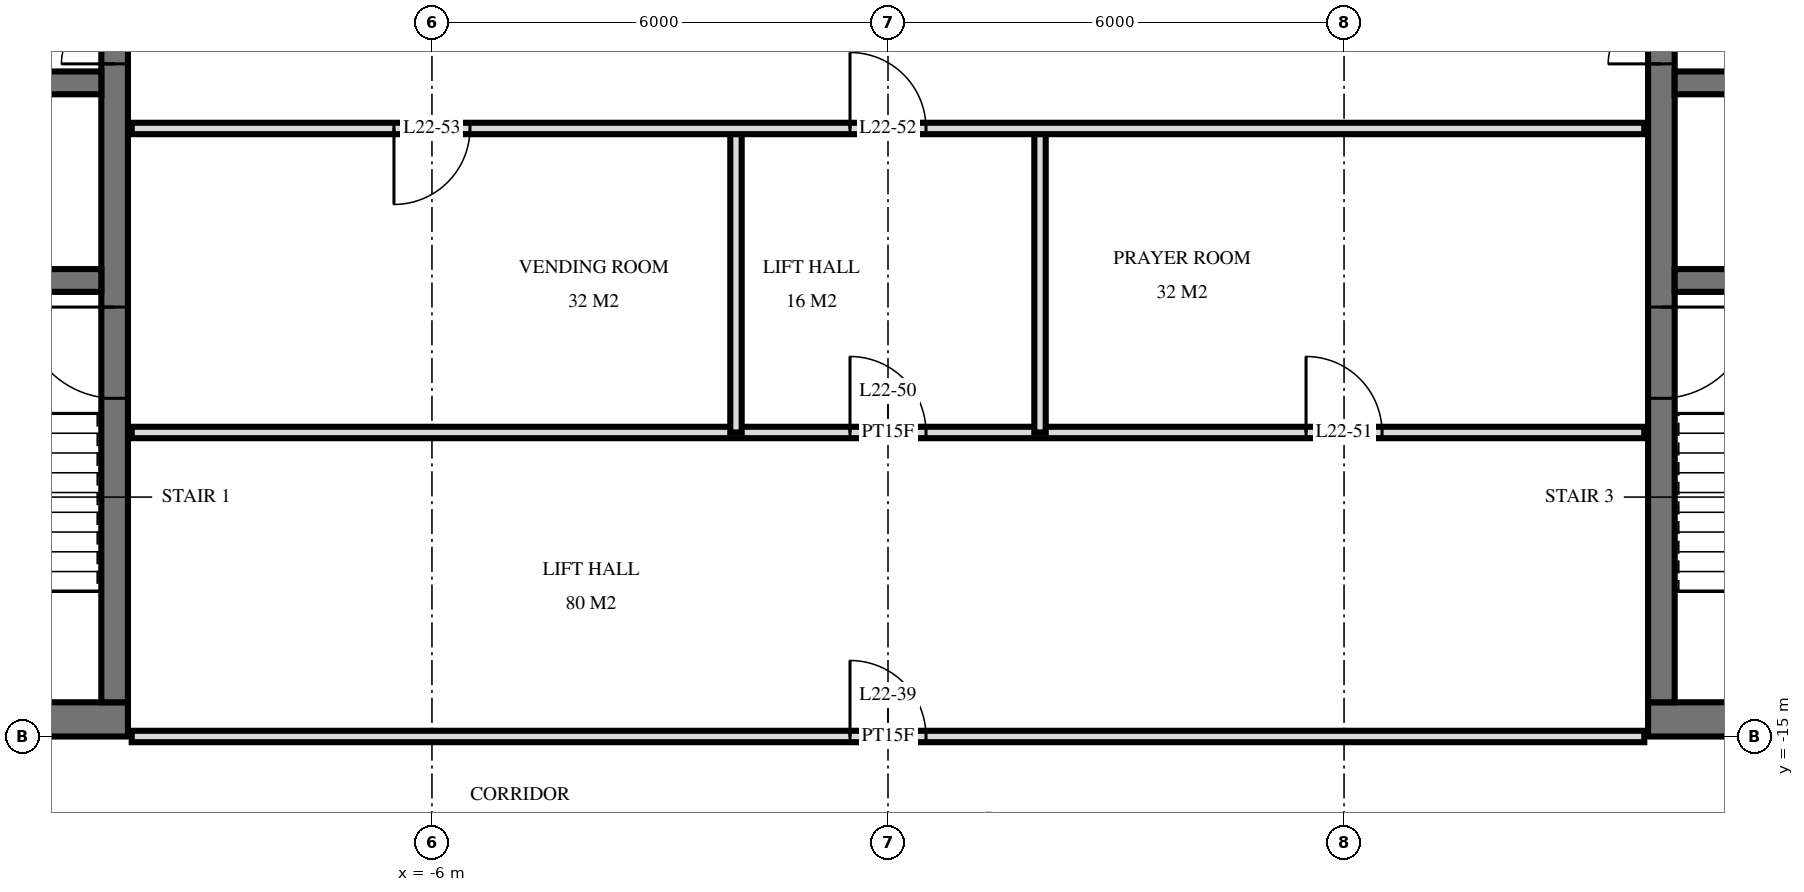
"""IFC4 building model, lengths in metres.
Left out: names, types, materials, properties, quantities, classifications, styles, units other than length and angle.
Written with IfcOpenShell. Run it as: python <this file> out.ifc"""

import sys

from ifc_helpers import new_model, si_unit, direction, frame, frame_2d, origin, place, context, subcontext, project, spatial, rectangle, extrude, element, fill, save


model = new_model("IFC4")
c1 = context("Model", 3, precision=1e-05, world=origin(), true_north=direction((0.0, 1.0)))
c2 = subcontext(c1, "Body", "Model", "MODEL_VIEW")
j1 = project(units=[si_unit("LENGTHUNIT", "METRE"), si_unit("PLANEANGLEUNIT", "RADIAN")], contexts=[c1])
p1 = place(None, origin())
s1 = spatial("IfcSite", under=j1, at=p1, CompositionType="ELEMENT")
p2 = place(p1, origin())
s2 = spatial("IfcBuilding", under=s1, at=p2, CompositionType="ELEMENT")
p3 = place(p2, frame((0.0, 0.0, 88.8)))
s3 = spatial("IfcBuildingStorey", under=s2, at=p3, CompositionType="ELEMENT", Elevation=88.8)
p4 = place(p3, frame((-29.5, -14.775, 0.0), z_axis=(0.0, 0.0, 1.0), x_axis=(1.0, 0.0, 0.0)))
e1 = element("IfcWall", 1, at=p4, inside=s3, PredefinedType="SHEAR", context=c2, shape_type="SweptSolid", body=[
    extrude(rectangle(XDim=19.5, YDim=0.45, at=frame_2d((9.75, 0.0))), origin(), (0.0, 0.0, 1.0), 3.6),
])
p5 = place(p4, frame((11.2, 0.0, 0.0)))
e2 = element("IfcOpeningElement", 2, at=p5, cuts=e1, PredefinedType="OPENING", context=c2, shape_type="SweptSolid", body=[
    extrude(rectangle(XDim=1.2, YDim=2.1, at=frame_2d((0.6, 1.05))), frame((0.0, 0.235, 0.0), z_axis=(0.0, -1.0, 0.0), x_axis=(1.0, 0.0, 0.0)), (0.0, 0.0, 1.0), 0.47),
])
p6 = place(p4, frame((14.25, 0.0, 0.0)))
e3 = element("IfcOpeningElement", 3, at=p6, cuts=e1, PredefinedType="OPENING", context=c2, shape_type="SweptSolid", body=[
    extrude(rectangle(XDim=1.1, YDim=2.1, at=frame_2d((0.55, 1.05))), frame((0.0, 0.235, 0.0), z_axis=(0.0, -1.0, 0.0), x_axis=(1.0, 0.0, 0.0)), (0.0, 0.0, 1.0), 0.47),
])
p7 = place(p4, frame((8.5, 0.0, 0.0)))
e4 = element("IfcOpeningElement", 4, at=p7, cuts=e1, PredefinedType="OPENING", context=c2, shape_type="SweptSolid", body=[
    extrude(rectangle(XDim=0.9, YDim=2.1, at=frame_2d((0.45, 1.05))), frame((0.0, 0.235, 0.0), z_axis=(0.0, -1.0, 0.0), x_axis=(1.0, 0.0, 0.0)), (0.0, 0.0, 1.0), 0.47),
])
p8 = place(p4, frame((6.05, 0.0, 0.0)))
e5 = element("IfcOpeningElement", 5, at=p8, cuts=e1, PredefinedType="OPENING", context=c2, shape_type="SweptSolid", body=[
    extrude(rectangle(XDim=1.0, YDim=2.1, at=frame_2d((0.5, 1.05))), frame((0.0, 0.235, 0.0), z_axis=(0.0, -1.0, 0.0), x_axis=(1.0, 0.0, 0.0)), (0.0, 0.0, 1.0), 0.47),
])
p9 = place(p4, frame((3.587, 0.0, 0.0)))
e6 = element("IfcOpeningElement", 6, at=p9, cuts=e1, PredefinedType="OPENING", context=c2, shape_type="SweptSolid", body=[
    extrude(rectangle(XDim=1.0, YDim=2.1, at=frame_2d((0.5, 1.05))), frame((0.0, 0.235, 0.0), z_axis=(0.0, -1.0, 0.0), x_axis=(1.0, 0.0, 0.0)), (0.0, 0.0, 1.0), 0.47),
])
p10 = place(p4, frame((1.85, 0.0, 0.0)))
e7 = element("IfcOpeningElement", 7, at=p10, cuts=e1, PredefinedType="OPENING", context=c2, shape_type="SweptSolid", body=[
    extrude(rectangle(XDim=1.0, YDim=2.1, at=frame_2d((0.5, 1.05))), frame((0.0, 0.235, 0.0), z_axis=(0.0, -1.0, 0.0), x_axis=(1.0, 0.0, 0.0)), (0.0, 0.0, 1.0), 0.47),
])
p11 = place(p4, frame((0.55, 0.0, 0.0)))
e8 = element("IfcOpeningElement", 8, at=p11, cuts=e1, PredefinedType="OPENING", context=c2, shape_type="SweptSolid", body=[
    extrude(rectangle(XDim=1.0, YDim=2.1, at=frame_2d((0.5, 1.05))), frame((0.0, 0.235, 0.0), z_axis=(0.0, -1.0, 0.0), x_axis=(1.0, 0.0, 0.0)), (0.0, 0.0, 1.0), 0.47),
])
p12 = place(p3, frame((-10.175, -14.55, 0.0), z_axis=(0.0, 0.0, 1.0), x_axis=(0.0, 1.0, 0.0)))
e9 = element("IfcWall", 9, at=p12, inside=s3, PredefinedType="SHEAR", context=c2, shape_type="SweptSolid", body=[
    extrude(rectangle(XDim=14.1, YDim=0.35, at=frame_2d((7.05, 0.0))), origin(), (0.0, 0.0, 1.0), 3.6),
])
p13 = place(p12, frame((8.4, 0.0, 0.0)))
e10 = element("IfcOpeningElement", 10, at=p13, cuts=e9, PredefinedType="OPENING", context=c2, shape_type="SweptSolid", body=[
    extrude(rectangle(XDim=1.4, YDim=2.4, at=frame_2d((0.7, 1.2))), frame((0.0, 0.185, 0.0), z_axis=(0.0, -1.0, 0.0), x_axis=(1.0, 0.0, 0.0)), (0.0, 0.0, 1.0), 0.37),
])
p14 = place(p12, frame((10.0, 0.0, 0.0)))
e11 = element("IfcOpeningElement", 11, at=p14, cuts=e9, PredefinedType="OPENING", context=c2, shape_type="SweptSolid", body=[
    extrude(rectangle(XDim=1.4, YDim=2.4, at=frame_2d((0.7, 1.2))), frame((0.0, 0.185, 0.0), z_axis=(0.0, -1.0, 0.0), x_axis=(1.0, 0.0, 0.0)), (0.0, 0.0, 1.0), 0.37),
])
p15 = place(p12, frame((4.0, 0.0, 0.0)))
e12 = element("IfcOpeningElement", 12, at=p15, cuts=e9, PredefinedType="OPENING", context=c2, shape_type="SweptSolid", body=[
    extrude(rectangle(XDim=1.2, YDim=2.1, at=frame_2d((0.6, 1.05))), frame((0.0, 0.185, 0.0), z_axis=(0.0, -1.0, 0.0), x_axis=(1.0, 0.0, 0.0)), (0.0, 0.0, 1.0), 0.37),
])
p16 = place(p3, frame((-29.05, -6.4, 0.0), z_axis=(0.0, 0.0, 1.0), x_axis=(1.0, 0.0, 0.0)))
e13 = element("IfcWall", 13, at=p16, inside=s3, PredefinedType="SHEAR", context=c2, shape_type="SweptSolid", body=[
    extrude(rectangle(XDim=18.7, YDim=0.3, at=frame_2d((9.35, 0.0))), origin(), (0.0, 0.0, 1.0), 3.6),
])
p17 = place(p16, frame((2.95, 0.0, 0.0)))
e14 = element("IfcOpeningElement", 14, at=p17, cuts=e13, PredefinedType="OPENING", context=c2, shape_type="SweptSolid", body=[
    extrude(rectangle(XDim=1.1, YDim=2.1, at=frame_2d((0.55, 1.05))), frame((0.0, 0.16, 0.0), z_axis=(0.0, -1.0, 0.0), x_axis=(1.0, 0.0, 0.0)), (0.0, 0.0, 1.0), 0.32),
])
p18 = place(p16, frame((0.55, 0.0, 0.0)))
e15 = element("IfcOpeningElement", 15, at=p18, cuts=e13, PredefinedType="OPENING", context=c2, shape_type="SweptSolid", body=[
    extrude(rectangle(XDim=1.1, YDim=2.1, at=frame_2d((0.55, 1.05))), frame((0.0, 0.16, 0.0), z_axis=(0.0, -1.0, 0.0), x_axis=(1.0, 0.0, 0.0)), (0.0, 0.0, 1.0), 0.32),
])
p19 = place(p16, frame((10.8, 0.0, 0.0)))
e16 = element("IfcOpeningElement", 16, at=p19, cuts=e13, PredefinedType="OPENING", context=c2, shape_type="SweptSolid", body=[
    extrude(rectangle(XDim=1.1, YDim=2.1, at=frame_2d((0.55, 1.05))), frame((0.0, 0.16, 0.0), z_axis=(0.0, -1.0, 0.0), x_axis=(1.0, 0.0, 0.0)), (0.0, 0.0, 1.0), 0.32),
])
p20 = place(p16, frame((5.6, 0.0, 0.0)))
e17 = element("IfcOpeningElement", 17, at=p20, cuts=e13, PredefinedType="OPENING", context=c2, shape_type="SweptSolid", body=[
    extrude(rectangle(XDim=1.0, YDim=2.1, at=frame_2d((0.5, 1.05))), frame((0.0, 0.16, 0.0), z_axis=(0.0, -1.0, 0.0), x_axis=(1.0, 0.0, 0.0)), (0.0, 0.0, 1.0), 0.32),
])
p21 = place(p3, frame((-29.05, -9.0, 0.0), z_axis=(0.0, 0.0, 1.0), x_axis=(1.0, 0.0, 0.0)))
e18 = element("IfcWall", 18, at=p21, inside=s3, PredefinedType="SHEAR", context=c2, shape_type="SweptSolid", body=[
    extrude(rectangle(XDim=18.7, YDim=0.3, at=frame_2d((9.35, 0.0))), origin(), (0.0, 0.0, 1.0), 3.6),
])
p22 = place(p21, frame((13.8, 0.0, 0.0)))
e19 = element("IfcOpeningElement", 19, at=p22, cuts=e18, PredefinedType="OPENING", context=c2, shape_type="SweptSolid", body=[
    extrude(rectangle(XDim=1.1, YDim=2.1, at=frame_2d((0.55, 1.05))), frame((0.0, 0.16, 0.0), z_axis=(0.0, -1.0, 0.0), x_axis=(1.0, 0.0, 0.0)), (0.0, 0.0, 1.0), 0.32),
])
p23 = place(p3, frame((10.0, -14.775, 0.0), z_axis=(0.0, 0.0, 1.0), x_axis=(1.0, 0.0, 0.0)))
e20 = element("IfcWall", 20, at=p23, inside=s3, PredefinedType="SHEAR", context=c2, shape_type="SweptSolid", body=[
    extrude(rectangle(XDim=19.5, YDim=0.45, at=frame_2d((9.75, 0.0))), origin(), (0.0, 0.0, 1.0), 3.6),
])
p24 = place(p23, frame((7.1, 0.0, 0.0)))
e21 = element("IfcOpeningElement", 21, at=p24, cuts=e20, PredefinedType="OPENING", context=c2, shape_type="SweptSolid", body=[
    extrude(rectangle(XDim=1.2, YDim=2.1, at=frame_2d((0.6, 1.05))), frame((0.0, 0.235, 0.0), z_axis=(0.0, -1.0, 0.0), x_axis=(1.0, 0.0, 0.0)), (0.0, 0.0, 1.0), 0.47),
])
p25 = place(p23, frame((4.15, 0.0, 0.0)))
e22 = element("IfcOpeningElement", 22, at=p25, cuts=e20, PredefinedType="OPENING", context=c2, shape_type="SweptSolid", body=[
    extrude(rectangle(XDim=1.1, YDim=2.1, at=frame_2d((0.55, 1.05))), frame((0.0, 0.235, 0.0), z_axis=(0.0, -1.0, 0.0), x_axis=(1.0, 0.0, 0.0)), (0.0, 0.0, 1.0), 0.47),
])
p26 = place(p23, frame((10.1, 0.0, 0.0)))
e23 = element("IfcOpeningElement", 23, at=p26, cuts=e20, PredefinedType="OPENING", context=c2, shape_type="SweptSolid", body=[
    extrude(rectangle(XDim=0.9, YDim=2.1, at=frame_2d((0.45, 1.05))), frame((0.0, 0.235, 0.0), z_axis=(0.0, -1.0, 0.0), x_axis=(1.0, 0.0, 0.0)), (0.0, 0.0, 1.0), 0.47),
])
p27 = place(p23, frame((12.45, 0.0, 0.0)))
e24 = element("IfcOpeningElement", 24, at=p27, cuts=e20, PredefinedType="OPENING", context=c2, shape_type="SweptSolid", body=[
    extrude(rectangle(XDim=1.0, YDim=2.1, at=frame_2d((0.5, 1.05))), frame((0.0, 0.235, 0.0), z_axis=(0.0, -1.0, 0.0), x_axis=(1.0, 0.0, 0.0)), (0.0, 0.0, 1.0), 0.47),
])
p28 = place(p23, frame((14.913, 0.0, 0.0)))
e25 = element("IfcOpeningElement", 25, at=p28, cuts=e20, PredefinedType="OPENING", context=c2, shape_type="SweptSolid", body=[
    extrude(rectangle(XDim=1.0, YDim=2.1, at=frame_2d((0.5, 1.05))), frame((0.0, 0.235, 0.0), z_axis=(0.0, -1.0, 0.0), x_axis=(1.0, 0.0, 0.0)), (0.0, 0.0, 1.0), 0.47),
])
p29 = place(p23, frame((16.65, 0.0, 0.0)))
e26 = element("IfcOpeningElement", 26, at=p29, cuts=e20, PredefinedType="OPENING", context=c2, shape_type="SweptSolid", body=[
    extrude(rectangle(XDim=1.0, YDim=2.1, at=frame_2d((0.5, 1.05))), frame((0.0, 0.235, 0.0), z_axis=(0.0, -1.0, 0.0), x_axis=(1.0, 0.0, 0.0)), (0.0, 0.0, 1.0), 0.47),
])
p30 = place(p23, frame((18.025, 0.0, 0.0)))
e27 = element("IfcOpeningElement", 27, at=p30, cuts=e20, PredefinedType="OPENING", context=c2, shape_type="SweptSolid", body=[
    extrude(rectangle(XDim=1.0, YDim=2.1, at=frame_2d((0.5, 1.05))), frame((0.0, 0.235, 0.0), z_axis=(0.0, -1.0, 0.0), x_axis=(1.0, 0.0, 0.0)), (0.0, 0.0, 1.0), 0.47),
])
p31 = place(p3, frame((10.175, -14.55, 0.0), z_axis=(0.0, 0.0, 1.0), x_axis=(0.0, 1.0, 0.0)))
e28 = element("IfcWall", 28, at=p31, inside=s3, PredefinedType="SHEAR", context=c2, shape_type="SweptSolid", body=[
    extrude(rectangle(XDim=14.1, YDim=0.35, at=frame_2d((7.05, 0.0))), origin(), (0.0, 0.0, 1.0), 3.6),
])
p32 = place(p31, frame((8.4, 0.0, 0.0)))
e29 = element("IfcOpeningElement", 29, at=p32, cuts=e28, PredefinedType="OPENING", context=c2, shape_type="SweptSolid", body=[
    extrude(rectangle(XDim=1.4, YDim=2.4, at=frame_2d((0.7, 1.2))), frame((0.0, 0.185, 0.0), z_axis=(0.0, -1.0, 0.0), x_axis=(1.0, 0.0, 0.0)), (0.0, 0.0, 1.0), 0.37),
])
p33 = place(p31, frame((10.0, 0.0, 0.0)))
e30 = element("IfcOpeningElement", 30, at=p33, cuts=e28, PredefinedType="OPENING", context=c2, shape_type="SweptSolid", body=[
    extrude(rectangle(XDim=1.4, YDim=2.4, at=frame_2d((0.7, 1.2))), frame((0.0, 0.185, 0.0), z_axis=(0.0, -1.0, 0.0), x_axis=(1.0, 0.0, 0.0)), (0.0, 0.0, 1.0), 0.37),
])
p34 = place(p31, frame((4.0, 0.0, 0.0)))
e31 = element("IfcOpeningElement", 31, at=p34, cuts=e28, PredefinedType="OPENING", context=c2, shape_type="SweptSolid", body=[
    extrude(rectangle(XDim=1.2, YDim=2.1, at=frame_2d((0.6, 1.05))), frame((0.0, 0.185, 0.0), z_axis=(0.0, -1.0, 0.0), x_axis=(1.0, 0.0, 0.0)), (0.0, 0.0, 1.0), 0.37),
])
p35 = place(p3, frame((10.35, -6.4, 0.0), z_axis=(0.0, 0.0, 1.0), x_axis=(1.0, 0.0, 0.0)))
e32 = element("IfcWall", 32, at=p35, inside=s3, PredefinedType="SHEAR", context=c2, shape_type="SweptSolid", body=[
    extrude(rectangle(XDim=18.7, YDim=0.3, at=frame_2d((9.35, 0.0))), origin(), (0.0, 0.0, 1.0), 3.6),
])
p36 = place(p35, frame((14.65, 0.0, 0.0)))
e33 = element("IfcOpeningElement", 33, at=p36, cuts=e32, PredefinedType="OPENING", context=c2, shape_type="SweptSolid", body=[
    extrude(rectangle(XDim=1.1, YDim=2.1, at=frame_2d((0.55, 1.05))), frame((0.0, 0.16, 0.0), z_axis=(0.0, -1.0, 0.0), x_axis=(1.0, 0.0, 0.0)), (0.0, 0.0, 1.0), 0.32),
])
p37 = place(p35, frame((17.05, 0.0, 0.0)))
e34 = element("IfcOpeningElement", 34, at=p37, cuts=e32, PredefinedType="OPENING", context=c2, shape_type="SweptSolid", body=[
    extrude(rectangle(XDim=1.1, YDim=2.1, at=frame_2d((0.55, 1.05))), frame((0.0, 0.16, 0.0), z_axis=(0.0, -1.0, 0.0), x_axis=(1.0, 0.0, 0.0)), (0.0, 0.0, 1.0), 0.32),
])
p38 = place(p35, frame((6.8, 0.0, 0.0)))
e35 = element("IfcOpeningElement", 35, at=p38, cuts=e32, PredefinedType="OPENING", context=c2, shape_type="SweptSolid", body=[
    extrude(rectangle(XDim=1.1, YDim=2.1, at=frame_2d((0.55, 1.05))), frame((0.0, 0.16, 0.0), z_axis=(0.0, -1.0, 0.0), x_axis=(1.0, 0.0, 0.0)), (0.0, 0.0, 1.0), 0.32),
])
p39 = place(p35, frame((12.1, 0.0, 0.0)))
e36 = element("IfcOpeningElement", 36, at=p39, cuts=e32, PredefinedType="OPENING", context=c2, shape_type="SweptSolid", body=[
    extrude(rectangle(XDim=1.0, YDim=2.1, at=frame_2d((0.5, 1.05))), frame((0.0, 0.16, 0.0), z_axis=(0.0, -1.0, 0.0), x_axis=(1.0, 0.0, 0.0)), (0.0, 0.0, 1.0), 0.32),
])
p40 = place(p3, frame((10.35, -9.0, 0.0), z_axis=(0.0, 0.0, 1.0), x_axis=(1.0, 0.0, 0.0)))
e37 = element("IfcWall", 37, at=p40, inside=s3, PredefinedType="SHEAR", context=c2, shape_type="SweptSolid", body=[
    extrude(rectangle(XDim=18.7, YDim=0.3, at=frame_2d((9.35, 0.0))), origin(), (0.0, 0.0, 1.0), 3.6),
])
p41 = place(p40, frame((3.8, 0.0, 0.0)))
e38 = element("IfcOpeningElement", 38, at=p41, cuts=e37, PredefinedType="OPENING", context=c2, shape_type="SweptSolid", body=[
    extrude(rectangle(XDim=1.1, YDim=2.1, at=frame_2d((0.55, 1.05))), frame((0.0, 0.16, 0.0), z_axis=(0.0, -1.0, 0.0), x_axis=(1.0, 0.0, 0.0)), (0.0, 0.0, 1.0), 0.32),
])
for number, where, z_axis, x_axis in (
    (39, (2.0, -11.0, 0.0), (0.0, 0.0, 1.0), (0.0, 1.0, 0.0)),
    (40, (-2.0, -11.0, 0.0), (0.0, 0.0, 1.0), (0.0, 1.0, 0.0)),
):
    element("IfcWall", number, at=place(p3, frame(where, z_axis=z_axis, x_axis=x_axis)), inside=s3, PredefinedType="PARTITIONING", context=c2, shape_type="SweptSolid", body=[
        extrude(rectangle(XDim=4.0, YDim=0.15, at=frame_2d((2.0, 0.0))), origin(), (0.0, 0.0, 1.0), 3.32),
    ])
p42 = place(p3, frame((-9.95, -15.0, 0.0), z_axis=(0.0, 0.0, 1.0), x_axis=(1.0, 0.0, 0.0)))
e41 = element("IfcWall", 41, at=p42, inside=s3, PredefinedType="PARTITIONING", context=c2, shape_type="SweptSolid", body=[
    extrude(rectangle(XDim=19.9, YDim=0.15, at=frame_2d((9.95, 0.0))), origin(), (0.0, 0.0, 1.0), 2.684),
])
p43 = place(p42, frame((9.45, 0.0, 0.0)))
e42 = element("IfcOpeningElement", 42, at=p43, cuts=e41, PredefinedType="OPENING", context=c2, shape_type="SweptSolid", body=[
    extrude(rectangle(XDim=1.0, YDim=2.1, at=frame_2d((0.5, 1.05))), frame((0.0, 0.085, 0.0), z_axis=(0.0, -1.0, 0.0), x_axis=(1.0, 0.0, 0.0)), (0.0, 0.0, 1.0), 0.17),
])
p44 = place(p3, frame((-9.95, -11.0, 0.0), z_axis=(0.0, 0.0, 1.0), x_axis=(1.0, 0.0, 0.0)))
e43 = element("IfcWall", 43, at=p44, inside=s3, PredefinedType="PARTITIONING", context=c2, shape_type="SweptSolid", body=[
    extrude(rectangle(XDim=19.9, YDim=0.15, at=frame_2d((9.95, 0.0))), origin(), (0.0, 0.0, 1.0), 3.32),
])
p45 = place(p44, frame((9.45, 0.0, 0.0)))
e44 = element("IfcOpeningElement", 44, at=p45, cuts=e43, PredefinedType="OPENING", context=c2, shape_type="SweptSolid", body=[
    extrude(rectangle(XDim=1.0, YDim=2.1, at=frame_2d((0.5, 1.05))), frame((0.0, 0.085, 0.0), z_axis=(0.0, -1.0, 0.0), x_axis=(1.0, 0.0, 0.0)), (0.0, 0.0, 1.0), 0.17),
])
p46 = place(p44, frame((15.45, 0.0, 0.0)))
e45 = element("IfcOpeningElement", 45, at=p46, cuts=e43, PredefinedType="OPENING", context=c2, shape_type="SweptSolid", body=[
    extrude(rectangle(XDim=1.0, YDim=2.1, at=frame_2d((0.5, 1.05))), frame((0.0, 0.085, 0.0), z_axis=(0.0, -1.0, 0.0), x_axis=(1.0, 0.0, 0.0)), (0.0, 0.0, 1.0), 0.17),
])
p47 = place(p3, frame((-9.95, -7.0, 0.0), z_axis=(0.0, 0.0, 1.0), x_axis=(1.0, 0.0, 0.0)))
e46 = element("IfcWall", 46, at=p47, inside=s3, PredefinedType="PARTITIONING", context=c2, shape_type="SweptSolid", body=[
    extrude(rectangle(XDim=19.9, YDim=0.15, at=frame_2d((9.95, 0.0))), origin(), (0.0, 0.0, 1.0), 3.32),
])
p48 = place(p47, frame((9.45, 0.0, 0.0)))
e47 = element("IfcOpeningElement", 47, at=p48, cuts=e46, PredefinedType="OPENING", context=c2, shape_type="SweptSolid", body=[
    extrude(rectangle(XDim=1.0, YDim=2.1, at=frame_2d((0.5, 1.05))), frame((0.0, 0.085, 0.0), z_axis=(0.0, -1.0, 0.0), x_axis=(1.0, 0.0, 0.0)), (0.0, 0.0, 1.0), 0.17),
])
p49 = place(p47, frame((3.45, 0.0, 0.0)))
e48 = element("IfcOpeningElement", 48, at=p49, cuts=e46, PredefinedType="OPENING", context=c2, shape_type="SweptSolid", body=[
    extrude(rectangle(XDim=1.0, YDim=2.1, at=frame_2d((0.5, 1.05))), frame((0.0, 0.085, 0.0), z_axis=(0.0, -1.0, 0.0), x_axis=(1.0, 0.0, 0.0)), (0.0, 0.0, 1.0), 0.17),
])
p50 = place(p13, origin())
e49 = element("IfcDoor", 49, at=p50, inside=s3, OperationType="DOUBLE_DOOR_SINGLE_SWING", PredefinedType="DOOR", context=c2, shape_type="SweptSolid", body=[
    extrude(rectangle(XDim=1.4, YDim=2.4, at=frame_2d((0.7, 1.2))), frame((0.0, 0.025, 0.0), z_axis=(0.0, -1.0, 0.0), x_axis=(1.0, 0.0, 0.0)), (0.0, 0.0, 1.0), 0.05),
])
fill(e10, e49)
p51 = place(p15, origin())
e50 = element("IfcDoor", 50, at=p51, inside=s3, OperationType="SINGLE_SWING_LEFT", PredefinedType="DOOR", context=c2, shape_type="SweptSolid", body=[
    extrude(rectangle(XDim=1.2, YDim=2.1, at=frame_2d((0.6, 1.05))), frame((0.0, 0.025, 0.0), z_axis=(0.0, -1.0, 0.0), x_axis=(1.0, 0.0, 0.0)), (0.0, 0.0, 1.0), 0.05),
])
fill(e12, e50)
p52 = place(p32, origin())
e51 = element("IfcDoor", 51, at=p52, inside=s3, OperationType="DOUBLE_DOOR_SINGLE_SWING", PredefinedType="DOOR", context=c2, shape_type="SweptSolid", body=[
    extrude(rectangle(XDim=1.4, YDim=2.4, at=frame_2d((0.7, 1.2))), frame((0.0, 0.025, 0.0), z_axis=(0.0, -1.0, 0.0), x_axis=(1.0, 0.0, 0.0)), (0.0, 0.0, 1.0), 0.05),
])
fill(e29, e51)
p53 = place(p34, frame((0.6, 0.0, 0.0), z_axis=(0.0, 0.0, 1.0), x_axis=(-1.0, 0.0, 0.0)))
e52 = element("IfcDoor", 52, at=p53, inside=s3, OperationType="SINGLE_SWING_RIGHT", PredefinedType="DOOR", context=c2, shape_type="SweptSolid", body=[
    extrude(rectangle(XDim=1.2, YDim=2.1, at=frame_2d((0.0, 1.05))), frame((0.0, -0.025, 0.0), z_axis=(0.0, 1.0, 0.0), x_axis=(-1.0, 0.0, 0.0)), (0.0, 0.0, 1.0), 0.05),
])
fill(e31, e52)
p54 = place(p43, origin())
e53 = element("IfcDoor", 53, at=p54, inside=s3, OperationType="SINGLE_SWING_RIGHT", PredefinedType="DOOR", context=c2, shape_type="SweptSolid", body=[
    extrude(rectangle(XDim=1.0, YDim=2.1, at=frame_2d((0.5, 1.05))), frame((0.0, 0.025, 0.0), z_axis=(0.0, -1.0, 0.0), x_axis=(1.0, 0.0, 0.0)), (0.0, 0.0, 1.0), 0.05),
])
fill(e42, e53)
p55 = place(p45, origin())
e54 = element("IfcDoor", 54, at=p55, inside=s3, OperationType="SINGLE_SWING_RIGHT", PredefinedType="DOOR", context=c2, shape_type="SweptSolid", body=[
    extrude(rectangle(XDim=1.0, YDim=2.1, at=frame_2d((0.5, 1.05))), frame((0.0, 0.025, 0.0), z_axis=(0.0, -1.0, 0.0), x_axis=(1.0, 0.0, 0.0)), (0.0, 0.0, 1.0), 0.05),
])
fill(e44, e54)
p56 = place(p46, origin())
e55 = element("IfcDoor", 55, at=p56, inside=s3, OperationType="SINGLE_SWING_RIGHT", PredefinedType="DOOR", context=c2, shape_type="SweptSolid", body=[
    extrude(rectangle(XDim=1.0, YDim=2.1, at=frame_2d((0.5, 1.05))), frame((0.0, 0.025, 0.0), z_axis=(0.0, -1.0, 0.0), x_axis=(1.0, 0.0, 0.0)), (0.0, 0.0, 1.0), 0.05),
])
fill(e45, e55)
p57 = place(p48, origin())
e56 = element("IfcDoor", 56, at=p57, inside=s3, OperationType="SINGLE_SWING_RIGHT", PredefinedType="DOOR", context=c2, shape_type="SweptSolid", body=[
    extrude(rectangle(XDim=1.0, YDim=2.1, at=frame_2d((0.5, 1.05))), frame((0.0, 0.025, 0.0), z_axis=(0.0, -1.0, 0.0), x_axis=(1.0, 0.0, 0.0)), (0.0, 0.0, 1.0), 0.05),
])
fill(e47, e56)
p58 = place(p49, frame((0.5, 0.0, 0.0), z_axis=(0.0, 0.0, 1.0), x_axis=(-1.0, 0.0, 0.0)))
e57 = element("IfcDoor", 57, at=p58, inside=s3, OperationType="SINGLE_SWING_LEFT", PredefinedType="DOOR", context=c2, shape_type="SweptSolid", body=[
    extrude(rectangle(XDim=1.0, YDim=2.1, at=frame_2d((0.0, 1.05))), frame((0.0, -0.025, 0.0), z_axis=(0.0, 1.0, 0.0), x_axis=(-1.0, 0.0, 0.0)), (0.0, 0.0, 1.0), 0.05),
])
fill(e48, e57)
save(model, sys.argv[1])
